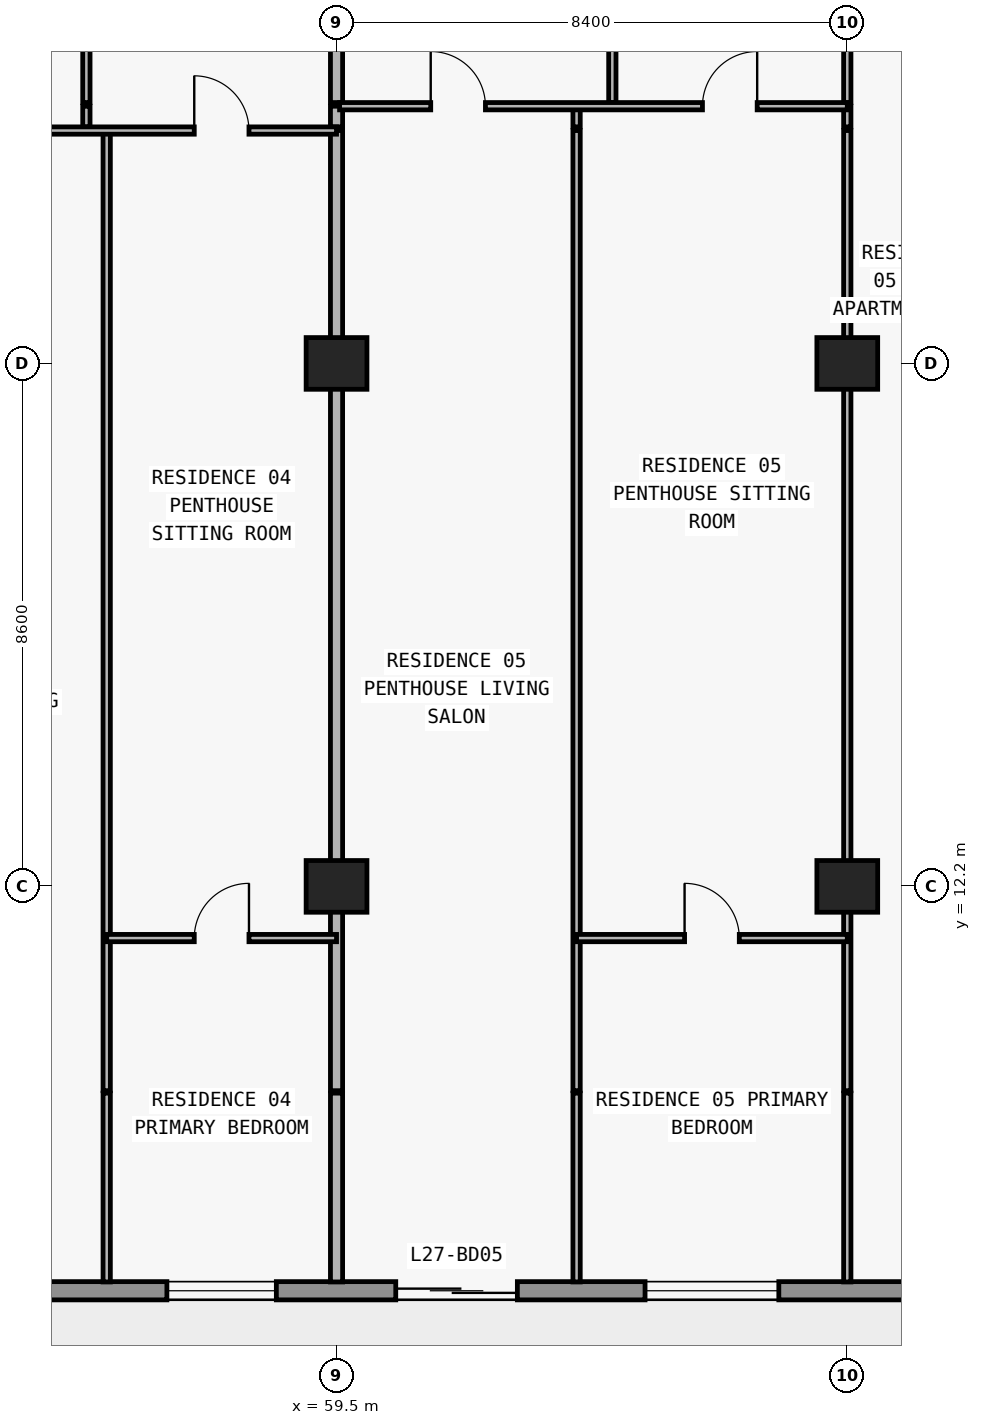
"""IFC4 building model, lengths in metres.
Left out: names, types, materials, properties, quantities, classifications, styles, units other than length and angle.
Written with IfcOpenShell. Run it as: python <this file> out.ifc"""

import sys

from ifc_helpers import new_model, si_unit, direction, frame, frame_2d, origin, origin_2d, place, context, subcontext, project, spatial, rectangle, extrude, element, fill, save


model = new_model("IFC4")
c1 = context("Model", 3, precision=1e-05, world=origin(), true_north=direction((0.0, 1.0)))
c2 = subcontext(c1, "Body", "Model", "MODEL_VIEW")
j1 = project(units=[si_unit("LENGTHUNIT", "METRE"), si_unit("PLANEANGLEUNIT", "RADIAN")], contexts=[c1])
p1 = place(None, origin())
s1 = spatial("IfcSite", under=j1, at=p1, CompositionType="ELEMENT")
p2 = place(p1, origin())
s2 = spatial("IfcBuilding", under=s1, at=p2, CompositionType="ELEMENT")
p3 = place(p2, frame((0.0, 0.0, 102.6)))
s3 = spatial("IfcBuildingStorey", under=s2, at=p3, CompositionType="ELEMENT", Elevation=102.6)
for number, where, z_axis, x_axis in (
    (1, (59.5, 12.2, 0.0), (0.0, 0.0, 1.0), (1.0, 0.0, 0.0)),
    (2, (67.9, 12.2, 0.0), (0.0, 0.0, 1.0), (1.0, 0.0, 0.0)),
    (3, (59.5, 20.8, 0.0), (0.0, 0.0, 1.0), (1.0, 0.0, 0.0)),
    (4, (67.9, 20.8, 0.0), (0.0, 0.0, 1.0), (1.0, 0.0, 0.0)),
):
    element("IfcColumn", number, at=place(p3, frame(where, z_axis=z_axis, x_axis=x_axis)), inside=s3, PredefinedType="COLUMN", context=c2, shape_type="SweptSolid", body=[
        extrude(rectangle(XDim=1.0, YDim=0.85, at=origin_2d()), origin(), (0.0, 0.0, 1.0), 3.05),
    ])
p4 = place(p3, frame((70.1, 5.55, 0.0), z_axis=(0.0, 0.0, 1.0), x_axis=(-1.0, 0.0, 0.0)))
e5 = element("IfcWall", 5, at=p4, inside=s3, PredefinedType="STANDARD", context=c2, shape_type="SweptSolid", body=[
    extrude(rectangle(XDim=62.4, YDim=0.3, at=frame_2d((31.2, 0.0))), origin(), (0.0, 0.0, 1.0), 3.05),
])
p5 = place(p4, frame((57.226, 0.0, 0.0)))
e6 = element("IfcOpeningElement", 6, at=p5, cuts=e5, PredefinedType="OPENING", context=c2, shape_type="SweptSolid", body=[
    extrude(rectangle(XDim=2.0, YDim=2.3, at=frame_2d((1.0, 1.15))), frame((0.0, 0.16, 0.0), z_axis=(0.0, -1.0, 0.0), x_axis=(1.0, 0.0, 0.0)), (0.0, 0.0, 1.0), 0.32),
])
p6 = place(p4, frame((52.926, 0.0, 0.85)))
e7 = element("IfcOpeningElement", 7, at=p6, cuts=e5, PredefinedType="OPENING", context=c2, shape_type="SweptSolid", body=[
    extrude(rectangle(XDim=2.2, YDim=1.55, at=frame_2d((1.1, 0.775))), frame((0.0, 0.16, 0.0), z_axis=(0.0, -1.0, 0.0), x_axis=(1.0, 0.0, 0.0)), (0.0, 0.0, 1.0), 0.32),
])
p7 = place(p4, frame((48.49, 0.0, 0.0)))
e8 = element("IfcOpeningElement", 8, at=p7, cuts=e5, PredefinedType="OPENING", context=c2, shape_type="SweptSolid", body=[
    extrude(rectangle(XDim=2.0, YDim=2.3, at=frame_2d((1.0, 1.15))), frame((0.0, 0.16, 0.0), z_axis=(0.0, -1.0, 0.0), x_axis=(1.0, 0.0, 0.0)), (0.0, 0.0, 1.0), 0.32),
])
p8 = place(p4, frame((44.39, 0.0, 0.85)))
e9 = element("IfcOpeningElement", 9, at=p8, cuts=e5, PredefinedType="OPENING", context=c2, shape_type="SweptSolid", body=[
    extrude(rectangle(XDim=1.8, YDim=1.55, at=frame_2d((0.9, 0.775))), frame((0.0, 0.16, 0.0), z_axis=(0.0, -1.0, 0.0), x_axis=(1.0, 0.0, 0.0)), (0.0, 0.0, 1.0), 0.32),
])
p9 = place(p4, frame((40.49, 0.0, 0.0)))
e10 = element("IfcOpeningElement", 10, at=p9, cuts=e5, PredefinedType="OPENING", context=c2, shape_type="SweptSolid", body=[
    extrude(rectangle(XDim=2.0, YDim=2.3, at=frame_2d((1.0, 1.15))), frame((0.0, 0.16, 0.0), z_axis=(0.0, -1.0, 0.0), x_axis=(1.0, 0.0, 0.0)), (0.0, 0.0, 1.0), 0.32),
])
p10 = place(p4, frame((35.81, 0.0, 0.65)))
e11 = element("IfcOpeningElement", 11, at=p10, cuts=e5, PredefinedType="OPENING", context=c2, shape_type="SweptSolid", body=[
    extrude(rectangle(XDim=2.6, YDim=1.85, at=frame_2d((1.3, 0.925))), frame((0.0, 0.16, 0.0), z_axis=(0.0, -1.0, 0.0), x_axis=(1.0, 0.0, 0.0)), (0.0, 0.0, 1.0), 0.32),
])
p11 = place(p4, frame((30.1, 0.0, 0.85)))
e12 = element("IfcOpeningElement", 12, at=p11, cuts=e5, PredefinedType="OPENING", context=c2, shape_type="SweptSolid", body=[
    extrude(rectangle(XDim=2.2, YDim=1.55, at=frame_2d((1.1, 0.775))), frame((0.0, 0.16, 0.0), z_axis=(0.0, -1.0, 0.0), x_axis=(1.0, 0.0, 0.0)), (0.0, 0.0, 1.0), 0.32),
])
p12 = place(p4, frame((22.1, 0.0, 0.85)))
e13 = element("IfcOpeningElement", 13, at=p12, cuts=e5, PredefinedType="OPENING", context=c2, shape_type="SweptSolid", body=[
    extrude(rectangle(XDim=2.2, YDim=1.55, at=frame_2d((1.1, 0.775))), frame((0.0, 0.16, 0.0), z_axis=(0.0, -1.0, 0.0), x_axis=(1.0, 0.0, 0.0)), (0.0, 0.0, 1.0), 0.32),
])
p13 = place(p4, frame((15.69, 0.0, 0.0)))
e14 = element("IfcOpeningElement", 14, at=p13, cuts=e5, PredefinedType="OPENING", context=c2, shape_type="SweptSolid", body=[
    extrude(rectangle(XDim=2.0, YDim=2.3, at=frame_2d((1.0, 1.15))), frame((0.0, 0.16, 0.0), z_axis=(0.0, -1.0, 0.0), x_axis=(1.0, 0.0, 0.0)), (0.0, 0.0, 1.0), 0.32),
])
p14 = place(p4, frame((11.59, 0.0, 0.85)))
e15 = element("IfcOpeningElement", 15, at=p14, cuts=e5, PredefinedType="OPENING", context=c2, shape_type="SweptSolid", body=[
    extrude(rectangle(XDim=1.8, YDim=1.55, at=frame_2d((0.9, 0.775))), frame((0.0, 0.16, 0.0), z_axis=(0.0, -1.0, 0.0), x_axis=(1.0, 0.0, 0.0)), (0.0, 0.0, 1.0), 0.32),
])
p15 = place(p4, frame((7.626, 0.0, 0.0)))
e16 = element("IfcOpeningElement", 16, at=p15, cuts=e5, PredefinedType="OPENING", context=c2, shape_type="SweptSolid", body=[
    extrude(rectangle(XDim=2.0, YDim=2.3, at=frame_2d((1.0, 1.15))), frame((0.0, 0.16, 0.0), z_axis=(0.0, -1.0, 0.0), x_axis=(1.0, 0.0, 0.0)), (0.0, 0.0, 1.0), 0.32),
])
p16 = place(p4, frame((3.326, 0.0, 0.85)))
e17 = element("IfcOpeningElement", 17, at=p16, cuts=e5, PredefinedType="OPENING", context=c2, shape_type="SweptSolid", body=[
    extrude(rectangle(XDim=2.2, YDim=1.55, at=frame_2d((1.1, 0.775))), frame((0.0, 0.16, 0.0), z_axis=(0.0, -1.0, 0.0), x_axis=(1.0, 0.0, 0.0)), (0.0, 0.0, 1.0), 0.32),
])
p17 = place(p3, frame((55.386, 24.69, 0.0), z_axis=(0.0, 0.0, 1.0), x_axis=(0.0, 1.0, 0.0)))
e18 = element("IfcWall", 18, at=p17, inside=s3, PredefinedType="PARTITIONING", context=c2, shape_type="SweptSolid", body=[
    extrude(rectangle(XDim=0.34, YDim=0.12, at=frame_2d((0.17, 0.0))), origin(), (0.0, 0.0, 1.0), 3.05),
])
p18 = place(p3, frame((55.386, 25.09, 0.0), z_axis=(0.0, 0.0, 1.0), x_axis=(0.0, 1.0, 0.0)))
e19 = element("IfcWall", 19, at=p18, inside=s3, PredefinedType="PARTITIONING", context=c2, shape_type="SweptSolid", body=[
    extrude(rectangle(XDim=4.69, YDim=0.12, at=frame_2d((2.345, 0.0))), origin(), (0.0, 0.0, 1.0), 2.725),
])
p19 = place(p18, frame((1.895, 0.0, 0.0)))
e20 = element("IfcOpeningElement", 20, at=p19, cuts=e19, PredefinedType="OPENING", context=c2, shape_type="SweptSolid", body=[
    extrude(rectangle(XDim=0.9, YDim=2.15, at=frame_2d((0.45, 1.075))), frame((0.0, 0.07, 0.0), z_axis=(0.0, -1.0, 0.0), x_axis=(1.0, 0.0, 0.0)), (0.0, 0.0, 1.0), 0.14),
])
p20 = place(p3, frame((55.72, 5.695, 0.0), z_axis=(0.0, 0.0, 1.0), x_axis=(0.0, 1.0, 0.0)))
e21 = element("IfcWall", 21, at=p20, inside=s3, PredefinedType="PARTITIONING", context=c2, shape_type="SweptSolid", body=[
    extrude(rectangle(XDim=3.105, YDim=0.12, at=frame_2d((1.552, 0.0))), origin(), (0.0, 0.0, 1.0), 3.05),
])
p21 = place(p3, frame((55.72, 8.84, 0.0), z_axis=(0.0, 0.0, 1.0), x_axis=(0.0, 1.0, 0.0)))
e22 = element("IfcWall", 22, at=p21, inside=s3, PredefinedType="PARTITIONING", context=c2, shape_type="SweptSolid", body=[
    extrude(rectangle(XDim=15.79, YDim=0.12, at=frame_2d((7.895, 0.0))), origin(), (0.0, 0.0, 1.0), 3.05),
])
p22 = place(p3, frame((59.5, 5.695, 0.0), z_axis=(0.0, 0.0, 1.0), x_axis=(0.0, 1.0, 0.0)))
e23 = element("IfcWall", 23, at=p22, inside=s3, PredefinedType="PARTITIONING", context=c2, shape_type="SweptSolid", body=[
    extrude(rectangle(XDim=3.105, YDim=0.2, at=frame_2d((1.552, 0.0))), origin(), (0.0, 0.0, 1.0), 3.05),
])
p23 = place(p3, frame((59.5, 8.84, 0.0), z_axis=(0.0, 0.0, 1.0), x_axis=(0.0, 1.0, 0.0)))
e24 = element("IfcWall", 24, at=p23, inside=s3, PredefinedType="PARTITIONING", context=c2, shape_type="SweptSolid", body=[
    extrude(rectangle(XDim=15.79, YDim=0.2, at=frame_2d((7.895, 0.0))), origin(), (0.0, 0.0, 1.0), 2.174),
])
p24 = place(p3, frame((59.5, 24.69, 0.0), z_axis=(0.0, 0.0, 1.0), x_axis=(0.0, 1.0, 0.0)))
e25 = element("IfcWall", 25, at=p24, inside=s3, PredefinedType="PARTITIONING", context=c2, shape_type="SweptSolid", body=[
    extrude(rectangle(XDim=0.34, YDim=0.2, at=frame_2d((0.17, 0.0))), origin(), (0.0, 0.0, 1.0), 2.174),
])
p25 = place(p3, frame((59.5, 25.09, 0.0), z_axis=(0.0, 0.0, 1.0), x_axis=(0.0, 1.0, 0.0)))
e26 = element("IfcWall", 26, at=p25, inside=s3, PredefinedType="PARTITIONING", context=c2, shape_type="SweptSolid", body=[
    extrude(rectangle(XDim=4.69, YDim=0.2, at=frame_2d((2.345, 0.0))), origin(), (0.0, 0.0, 1.0), 2.174),
])
p26 = place(p3, frame((63.448, 5.695, 0.0), z_axis=(0.0, 0.0, 1.0), x_axis=(0.0, 1.0, 0.0)))
e27 = element("IfcWall", 27, at=p26, inside=s3, PredefinedType="PARTITIONING", context=c2, shape_type="SweptSolid", body=[
    extrude(rectangle(XDim=3.105, YDim=0.12, at=frame_2d((1.552, 0.0))), origin(), (0.0, 0.0, 1.0), 3.05),
])
p27 = place(p3, frame((63.448, 8.84, 0.0), z_axis=(0.0, 0.0, 1.0), x_axis=(0.0, 1.0, 0.0)))
e28 = element("IfcWall", 28, at=p27, inside=s3, PredefinedType="PARTITIONING", context=c2, shape_type="SweptSolid", body=[
    extrude(rectangle(XDim=15.79, YDim=0.12, at=frame_2d((7.895, 0.0))), origin(), (0.0, 0.0, 1.0), 3.05),
])
p28 = place(p3, frame((63.448, 24.69, 0.0), z_axis=(0.0, 0.0, 1.0), x_axis=(0.0, 1.0, 0.0)))
e29 = element("IfcWall", 29, at=p28, inside=s3, PredefinedType="PARTITIONING", context=c2, shape_type="SweptSolid", body=[
    extrude(rectangle(XDim=0.34, YDim=0.12, at=frame_2d((0.17, 0.0))), origin(), (0.0, 0.0, 1.0), 3.05),
])
p29 = place(p3, frame((64.036, 25.09, 0.0), z_axis=(0.0, 0.0, 1.0), x_axis=(0.0, 1.0, 0.0)))
e30 = element("IfcWall", 30, at=p29, inside=s3, PredefinedType="PARTITIONING", context=c2, shape_type="SweptSolid", body=[
    extrude(rectangle(XDim=4.69, YDim=0.12, at=frame_2d((2.345, 0.0))), origin(), (0.0, 0.0, 1.0), 3.05),
])
p30 = place(p29, frame((1.895, 0.0, 0.0)))
e31 = element("IfcOpeningElement", 31, at=p30, cuts=e30, PredefinedType="OPENING", context=c2, shape_type="SweptSolid", body=[
    extrude(rectangle(XDim=0.9, YDim=2.15, at=frame_2d((0.45, 1.075))), frame((0.0, 0.07, 0.0), z_axis=(0.0, -1.0, 0.0), x_axis=(1.0, 0.0, 0.0)), (0.0, 0.0, 1.0), 0.14),
])
p31 = place(p3, frame((67.9, 5.695, 0.0), z_axis=(0.0, 0.0, 1.0), x_axis=(0.0, 1.0, 0.0)))
e32 = element("IfcWall", 32, at=p31, inside=s3, PredefinedType="PARTITIONING", context=c2, shape_type="SweptSolid", body=[
    extrude(rectangle(XDim=3.105, YDim=0.12, at=frame_2d((1.552, 0.0))), origin(), (0.0, 0.0, 1.0), 3.05),
])
p32 = place(p3, frame((67.9, 8.84, 0.0), z_axis=(0.0, 0.0, 1.0), x_axis=(0.0, 1.0, 0.0)))
e33 = element("IfcWall", 33, at=p32, inside=s3, PredefinedType="PARTITIONING", context=c2, shape_type="SweptSolid", body=[
    extrude(rectangle(XDim=15.79, YDim=0.12, at=frame_2d((7.895, 0.0))), origin(), (0.0, 0.0, 1.0), 2.174),
])
p33 = place(p3, frame((67.9, 24.69, 0.0), z_axis=(0.0, 0.0, 1.0), x_axis=(0.0, 1.0, 0.0)))
e34 = element("IfcWall", 34, at=p33, inside=s3, PredefinedType="PARTITIONING", context=c2, shape_type="SweptSolid", body=[
    extrude(rectangle(XDim=0.34, YDim=0.12, at=frame_2d((0.17, 0.0))), origin(), (0.0, 0.0, 1.0), 2.174),
])
p34 = place(p3, frame((67.9, 25.09, 0.0), z_axis=(0.0, 0.0, 1.0), x_axis=(0.0, 1.0, 0.0)))
e35 = element("IfcWall", 35, at=p34, inside=s3, PredefinedType="PARTITIONING", context=c2, shape_type="SweptSolid", body=[
    extrude(rectangle(XDim=4.69, YDim=0.12, at=frame_2d((2.345, 0.0))), origin(), (0.0, 0.0, 1.0), 2.174),
])
p35 = place(p34, frame((1.895, 0.0, 0.0)))
e36 = element("IfcOpeningElement", 36, at=p35, cuts=e35, PredefinedType="OPENING", context=c2, shape_type="SweptSolid", body=[
    extrude(rectangle(XDim=0.9, YDim=2.124, at=frame_2d((0.45, 1.062))), frame((0.0, 0.07, 0.0), z_axis=(0.0, -1.0, 0.0), x_axis=(1.0, 0.0, 0.0)), (0.0, 0.0, 1.0), 0.14),
])
p36 = place(p3, frame((55.72, 11.35, 0.0), z_axis=(0.0, 0.0, 1.0), x_axis=(1.0, 0.0, 0.0)))
e37 = element("IfcWall", 37, at=p36, inside=s3, PredefinedType="PARTITIONING", context=c2, shape_type="SweptSolid", body=[
    extrude(rectangle(XDim=3.78, YDim=0.12, at=frame_2d((1.89, 0.0))), origin(), (0.0, 0.0, 1.0), 3.05),
])
p37 = place(p36, frame((1.44, 0.0, 0.0)))
e38 = element("IfcOpeningElement", 38, at=p37, cuts=e37, PredefinedType="OPENING", context=c2, shape_type="SweptSolid", body=[
    extrude(rectangle(XDim=0.9, YDim=2.15, at=frame_2d((0.45, 1.075))), frame((0.0, 0.07, 0.0), z_axis=(0.0, -1.0, 0.0), x_axis=(1.0, 0.0, 0.0)), (0.0, 0.0, 1.0), 0.14),
])
p38 = place(p3, frame((63.448, 11.35, 0.0), z_axis=(0.0, 0.0, 1.0), x_axis=(1.0, 0.0, 0.0)))
e39 = element("IfcWall", 39, at=p38, inside=s3, PredefinedType="PARTITIONING", context=c2, shape_type="SweptSolid", body=[
    extrude(rectangle(XDim=4.452, YDim=0.12, at=frame_2d((2.226, 0.0))), origin(), (0.0, 0.0, 1.0), 3.05),
])
p39 = place(p38, frame((1.776, 0.0, 0.0)))
e40 = element("IfcOpeningElement", 40, at=p39, cuts=e39, PredefinedType="OPENING", context=c2, shape_type="SweptSolid", body=[
    extrude(rectangle(XDim=0.9, YDim=2.15, at=frame_2d((0.45, 1.075))), frame((0.0, 0.07, 0.0), z_axis=(0.0, -1.0, 0.0), x_axis=(1.0, 0.0, 0.0)), (0.0, 0.0, 1.0), 0.14),
])
p40 = place(p3, frame((51.32, 24.63, 0.0), z_axis=(0.0, 0.0, 1.0), x_axis=(1.0, 0.0, 0.0)))
e41 = element("IfcWall", 41, at=p40, inside=s3, PredefinedType="PARTITIONING", context=c2, shape_type="SweptSolid", body=[
    extrude(rectangle(XDim=8.18, YDim=0.12, at=frame_2d((4.09, 0.0))), origin(), (0.0, 0.0, 1.0), 3.05),
])
p41 = place(p40, frame((1.583, 0.0, 0.0)))
e42 = element("IfcOpeningElement", 42, at=p41, cuts=e41, PredefinedType="OPENING", context=c2, shape_type="SweptSolid", body=[
    extrude(rectangle(XDim=0.9, YDim=2.15, at=frame_2d((0.45, 1.075))), frame((0.0, 0.07, 0.0), z_axis=(0.0, -1.0, 0.0), x_axis=(1.0, 0.0, 0.0)), (0.0, 0.0, 1.0), 0.14),
])
p42 = place(p40, frame((5.84, 0.0, 0.0)))
e43 = element("IfcOpeningElement", 43, at=p42, cuts=e41, PredefinedType="OPENING", context=c2, shape_type="SweptSolid", body=[
    extrude(rectangle(XDim=0.9, YDim=2.15, at=frame_2d((0.45, 1.075))), frame((0.0, 0.07, 0.0), z_axis=(0.0, -1.0, 0.0), x_axis=(1.0, 0.0, 0.0)), (0.0, 0.0, 1.0), 0.14),
])
p43 = place(p3, frame((59.55, 25.03, 0.0), z_axis=(0.0, 0.0, 1.0), x_axis=(1.0, 0.0, 0.0)))
e44 = element("IfcWall", 44, at=p43, inside=s3, PredefinedType="PARTITIONING", context=c2, shape_type="SweptSolid", body=[
    extrude(rectangle(XDim=8.35, YDim=0.12, at=frame_2d((4.175, 0.0))), origin(), (0.0, 0.0, 1.0), 3.05),
])
p44 = place(p43, frame((1.499, 0.0, 0.0)))
e45 = element("IfcOpeningElement", 45, at=p44, cuts=e44, PredefinedType="OPENING", context=c2, shape_type="SweptSolid", body=[
    extrude(rectangle(XDim=0.9, YDim=2.15, at=frame_2d((0.45, 1.075))), frame((0.0, 0.07, 0.0), z_axis=(0.0, -1.0, 0.0), x_axis=(1.0, 0.0, 0.0)), (0.0, 0.0, 1.0), 0.14),
])
p45 = place(p43, frame((5.968, 0.0, 0.0)))
e46 = element("IfcOpeningElement", 46, at=p45, cuts=e44, PredefinedType="OPENING", context=c2, shape_type="SweptSolid", body=[
    extrude(rectangle(XDim=0.9, YDim=2.15, at=frame_2d((0.45, 1.075))), frame((0.0, 0.07, 0.0), z_axis=(0.0, -1.0, 0.0), x_axis=(1.0, 0.0, 0.0)), (0.0, 0.0, 1.0), 0.14),
])
p46 = place(p14, origin())
e47 = element("IfcWindow", 47, at=p46, inside=s3, PartitioningType="SINGLE_PANEL", PredefinedType="WINDOW", context=c2, shape_type="SweptSolid", body=[
    extrude(rectangle(XDim=1.8, YDim=1.55, at=frame_2d((0.9, 0.775))), frame((0.0, 0.03, 0.0), z_axis=(0.0, -1.0, 0.0), x_axis=(1.0, 0.0, 0.0)), (0.0, 0.0, 1.0), 0.06),
])
fill(e15, e47)
p47 = place(p15, origin())
e48 = element("IfcDoor", 48, at=p47, inside=s3, OperationType="DOUBLE_DOOR_SLIDING", PredefinedType="DOOR", context=c2, shape_type="SweptSolid", body=[
    extrude(rectangle(XDim=2.0, YDim=2.3, at=frame_2d((1.0, 1.15))), frame((0.0, 0.025, 0.0), z_axis=(0.0, -1.0, 0.0), x_axis=(1.0, 0.0, 0.0)), (0.0, 0.0, 1.0), 0.05),
])
fill(e16, e48)
p48 = place(p16, origin())
e49 = element("IfcWindow", 49, at=p48, inside=s3, PartitioningType="SINGLE_PANEL", PredefinedType="WINDOW", context=c2, shape_type="SweptSolid", body=[
    extrude(rectangle(XDim=2.2, YDim=1.55, at=frame_2d((1.1, 0.775))), frame((0.0, 0.03, 0.0), z_axis=(0.0, -1.0, 0.0), x_axis=(1.0, 0.0, 0.0)), (0.0, 0.0, 1.0), 0.06),
])
fill(e17, e49)
p49 = place(p42, origin())
e50 = element("IfcDoor", 50, at=p49, inside=s3, OperationType="SINGLE_SWING_LEFT", PredefinedType="DOOR", context=c2, shape_type="SweptSolid", body=[
    extrude(rectangle(XDim=0.9, YDim=2.15, at=frame_2d((0.45, 1.075))), frame((0.0, 0.025, 0.0), z_axis=(0.0, -1.0, 0.0), x_axis=(1.0, 0.0, 0.0)), (0.0, 0.0, 1.0), 0.05),
])
fill(e43, e50)
p50 = place(p37, origin())
e51 = element("IfcDoor", 51, at=p50, inside=s3, OperationType="SINGLE_SWING_RIGHT", PredefinedType="DOOR", context=c2, shape_type="SweptSolid", body=[
    extrude(rectangle(XDim=0.9, YDim=2.15, at=frame_2d((0.45, 1.075))), frame((0.0, 0.025, 0.0), z_axis=(0.0, -1.0, 0.0), x_axis=(1.0, 0.0, 0.0)), (0.0, 0.0, 1.0), 0.05),
])
fill(e38, e51)
p51 = place(p44, origin())
e52 = element("IfcDoor", 52, at=p51, inside=s3, OperationType="SINGLE_SWING_LEFT", PredefinedType="DOOR", context=c2, shape_type="SweptSolid", body=[
    extrude(rectangle(XDim=0.9, YDim=2.15, at=frame_2d((0.45, 1.075))), frame((0.0, 0.025, 0.0), z_axis=(0.0, -1.0, 0.0), x_axis=(1.0, 0.0, 0.0)), (0.0, 0.0, 1.0), 0.05),
])
fill(e45, e52)
p52 = place(p45, origin())
e53 = element("IfcDoor", 53, at=p52, inside=s3, OperationType="SINGLE_SWING_RIGHT", PredefinedType="DOOR", context=c2, shape_type="SweptSolid", body=[
    extrude(rectangle(XDim=0.9, YDim=2.15, at=frame_2d((0.45, 1.075))), frame((0.0, 0.025, 0.0), z_axis=(0.0, -1.0, 0.0), x_axis=(1.0, 0.0, 0.0)), (0.0, 0.0, 1.0), 0.05),
])
fill(e46, e53)
p53 = place(p39, origin())
e54 = element("IfcDoor", 54, at=p53, inside=s3, OperationType="SINGLE_SWING_LEFT", PredefinedType="DOOR", context=c2, shape_type="SweptSolid", body=[
    extrude(rectangle(XDim=0.9, YDim=2.15, at=frame_2d((0.45, 1.075))), frame((0.0, 0.025, 0.0), z_axis=(0.0, -1.0, 0.0), x_axis=(1.0, 0.0, 0.0)), (0.0, 0.0, 1.0), 0.05),
])
fill(e40, e54)
save(model, sys.argv[1])
